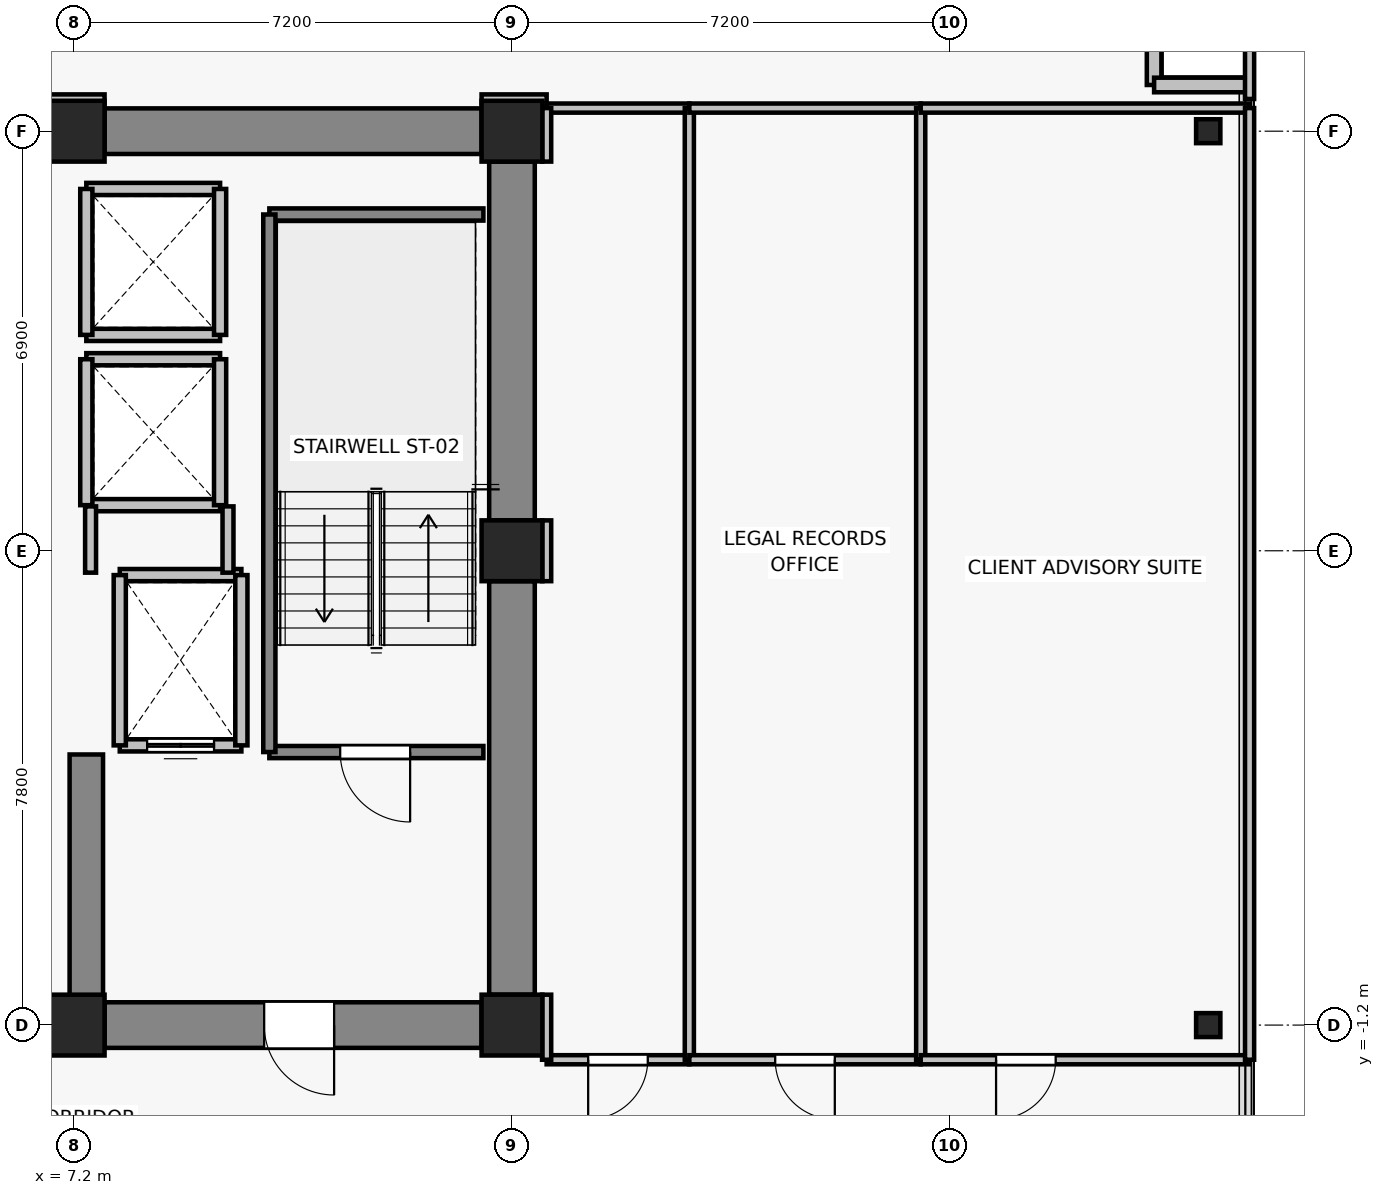
"""IFC4 building model, lengths in metres.
Left out: names, types, materials, properties, quantities, classifications, styles, units other than length and angle.
Written with IfcOpenShell. Run it as: python <this file> out.ifc"""

import sys

from ifc_helpers import new_model, si_unit, direction, frame, frame_2d, origin, origin_2d, place, context, subcontext, project, spatial, rectangle, i_section, extrude, source, transform, mapped, element, fill, save


model = new_model("IFC4")
c1 = context("Model", 3, precision=1e-05, world=origin(), true_north=direction((0.0, 1.0)))
c2 = subcontext(c1, "Body", "Model", "MODEL_VIEW")
j1 = project(units=[si_unit("LENGTHUNIT", "METRE"), si_unit("PLANEANGLEUNIT", "RADIAN")], contexts=[c1])
p1 = place(None, origin())
s1 = spatial("IfcSite", under=j1, at=p1, CompositionType="ELEMENT")
p2 = place(p1, origin())
s2 = spatial("IfcBuilding", under=s1, at=p2, CompositionType="ELEMENT")
p3 = place(p2, frame((0.0, 0.0, 192.4)))
s3 = spatial("IfcBuildingStorey", under=s2, at=p3, CompositionType="ELEMENT", Elevation=192.4)
for number, where, z_axis, x_axis in (
    (1, (7.2, -1.2, 0.0), (0.0, 0.0, 1.0), (1.0, 0.0, 0.0)),
    (2, (14.4, -1.2, 0.0), (0.0, 0.0, 1.0), (1.0, 0.0, 0.0)),
    (3, (14.4, 6.6, 0.0), (0.0, 0.0, 1.0), (1.0, 0.0, 0.0)),
    (4, (7.2, 13.5, 0.0), (0.0, 0.0, 1.0), (1.0, 0.0, 0.0)),
    (5, (14.4, 13.5, 0.0), (0.0, 0.0, 1.0), (1.0, 0.0, 0.0)),
):
    element("IfcColumn", number, at=place(p3, frame(where, z_axis=z_axis, x_axis=x_axis)), inside=s3, PredefinedType="COLUMN", context=c2, shape_type="SweptSolid", body=[
        extrude(rectangle(XDim=1.0, YDim=1.0, at=origin_2d()), origin(), (0.0, 0.0, 1.0), 3.3),
    ])
for number, where, z_axis, x_axis in (
    (6, (25.85, -1.2, 0.0), (0.0, 0.0, 1.0), (1.0, 0.0, 0.0)),
    (7, (25.85, 13.5, 0.0), (0.0, 0.0, 1.0), (1.0, 0.0, 0.0)),
):
    element("IfcColumn", number, at=place(p3, frame(where, z_axis=z_axis, x_axis=x_axis)), inside=s3, PredefinedType="COLUMN", context=c2, shape_type="SweptSolid", body=[
        extrude(i_section(OverallWidth=0.399, OverallDepth=0.394, WebThickness=0.023, FlangeThickness=0.037, FilletRadius=0.015, at=origin_2d()), origin(), (0.0, 0.0, 1.0), 3.3),
    ])
p4 = place(p3, frame((7.7, 13.5, 0.0), z_axis=(0.0, 0.0, 1.0), x_axis=(1.0, 0.0, 0.0)))
e8 = element("IfcWall", 8, at=p4, inside=s3, PredefinedType="SHEAR", context=c2, shape_type="SweptSolid", body=[
    extrude(rectangle(XDim=6.2, YDim=0.75, at=frame_2d((3.1, 0.0))), origin(), (0.0, 0.0, 1.0), 3.075),
])
p5 = place(p3, frame((14.4, -0.7, 0.0), z_axis=(0.0, 0.0, 1.0), x_axis=(0.0, 1.0, 0.0)))
e9 = element("IfcWall", 9, at=p5, inside=s3, PredefinedType="SHEAR", context=c2, shape_type="SweptSolid", body=[
    extrude(rectangle(XDim=6.8, YDim=0.75, at=frame_2d((3.4, 0.0))), origin(), (0.0, 0.0, 1.0), 3.075),
])
p6 = place(p3, frame((14.4, 7.1, 0.0), z_axis=(0.0, 0.0, 1.0), x_axis=(0.0, 1.0, 0.0)))
e10 = element("IfcWall", 10, at=p6, inside=s3, PredefinedType="SHEAR", context=c2, shape_type="SweptSolid", body=[
    extrude(rectangle(XDim=5.9, YDim=0.75, at=frame_2d((2.95, 0.0))), origin(), (0.0, 0.0, 1.0), 3.075),
])
p7 = place(p3, frame((13.9, -1.2, 0.0), z_axis=(0.0, 0.0, 1.0), x_axis=(-1.0, 0.0, 0.0)))
e11 = element("IfcWall", 11, at=p7, inside=s3, PredefinedType="SHEAR", context=c2, shape_type="SweptSolid", body=[
    extrude(rectangle(XDim=6.2, YDim=0.75, at=frame_2d((3.1, 0.0))), origin(), (0.0, 0.0, 1.0), 3.075),
])
p8 = place(p7, frame((2.425, 0.0, 0.0)))
e12 = element("IfcOpeningElement", 12, at=p8, cuts=e11, PredefinedType="OPENING", context=c2, shape_type="SweptSolid", body=[
    extrude(rectangle(XDim=1.15, YDim=2.15, at=frame_2d((0.575, 1.075))), frame((0.0, 0.385, 0.0), z_axis=(0.0, -1.0, 0.0), x_axis=(1.0, 0.0, 0.0)), (0.0, 0.0, 1.0), 0.77),
])
p9 = place(p3, frame((7.4, -0.825, 0.0), z_axis=(0.0, 0.0, 1.0), x_axis=(0.0, 1.0, 0.0)))
e13 = element("IfcWall", 13, at=p9, inside=s3, PredefinedType="SHEAR", context=c2, shape_type="SweptSolid", body=[
    extrude(rectangle(XDim=4.075, YDim=0.55, at=frame_2d((2.038, 0.0))), origin(), (0.0, 0.0, 1.0), 3.075),
])
for number, where, z_axis, x_axis in (
    (14, (24.96, 14.26, 0.0), (0.0, 0.0, 1.0), (0.0, 1.0, 0.0)),
    (15, (26.46, 14.26, 0.0), (0.0, 0.0, 1.0), (-1.0, 0.0, 0.0)),
):
    element("IfcWall", number, at=place(p3, frame(where, z_axis=z_axis, x_axis=x_axis)), inside=s3, PredefinedType="SOLIDWALL", context=c2, shape_type="SweptSolid", body=[
        extrude(rectangle(XDim=1.5, YDim=0.24, at=frame_2d((0.75, 0.0))), origin(), (0.0, 0.0, 1.0), 3.075),
    ])
p10 = place(p3, frame((9.95, 3.4, 0.0), z_axis=(0.0, 0.0, 1.0), x_axis=(-1.0, 0.0, 0.0)))
e16 = element("IfcWall", 16, at=p10, inside=s3, PredefinedType="SOLIDWALL", context=c2, shape_type="SweptSolid", body=[
    extrude(rectangle(XDim=2.0, YDim=0.2, at=frame_2d((1.0, 0.0))), origin(), (0.0, 0.0, 1.0), 3.075),
])
p11 = place(p10, frame((0.45, 0.0, 0.0)))
e17 = element("IfcOpeningElement", 17, at=p11, cuts=e16, PredefinedType="OPENING", context=c2, shape_type="SweptSolid", body=[
    extrude(rectangle(XDim=1.1, YDim=2.2, at=frame_2d((0.55, 1.1))), frame((0.0, 0.11, 0.0), z_axis=(0.0, -1.0, 0.0), x_axis=(1.0, 0.0, 0.0)), (0.0, 0.0, 1.0), 0.22),
])
p12 = place(p3, frame((7.95, 6.2, 0.0), z_axis=(0.0, 0.0, 1.0), x_axis=(1.0, 0.0, 0.0)))
e18 = element("IfcWall", 18, at=p12, inside=s3, PredefinedType="SOLIDWALL", context=c2, shape_type="SweptSolid", body=[
    extrude(rectangle(XDim=2.0, YDim=0.2, at=frame_2d((1.0, 0.0))), origin(), (0.0, 0.0, 1.0), 3.075),
])
for number, where, z_axis, x_axis in (
    (19, (7.95, 3.4, 0.0), (0.0, 0.0, 1.0), (0.0, 1.0, 0.0)),
    (20, (9.95, 6.2, 0.0), (0.0, 0.0, 1.0), (0.0, -1.0, 0.0)),
):
    element("IfcWall", number, at=place(p3, frame(where, z_axis=z_axis, x_axis=x_axis)), inside=s3, PredefinedType="SOLIDWALL", context=c2, shape_type="SweptSolid", body=[
        extrude(rectangle(XDim=2.8, YDim=0.2, at=frame_2d((1.4, 0.0))), origin(), (0.0, 0.0, 1.0), 3.075),
    ])
for number, where, z_axis, x_axis in (
    (21, (9.6, 7.35, 0.0), (0.0, 0.0, 1.0), (-1.0, 0.0, 0.0)),
    (22, (7.4, 9.75, 0.0), (0.0, 0.0, 1.0), (1.0, 0.0, 0.0)),
):
    element("IfcWall", number, at=place(p3, frame(where, z_axis=z_axis, x_axis=x_axis)), inside=s3, PredefinedType="SOLIDWALL", context=c2, shape_type="SweptSolid", body=[
        extrude(rectangle(XDim=2.2, YDim=0.2, at=frame_2d((1.1, 0.0))), origin(), (0.0, 0.0, 1.0), 2.565),
    ])
p13 = place(p3, frame((7.4, 7.35, 0.0), z_axis=(0.0, 0.0, 1.0), x_axis=(0.0, 1.0, 0.0)))
e23 = element("IfcWall", 23, at=p13, inside=s3, PredefinedType="SOLIDWALL", context=c2, shape_type="SweptSolid", body=[
    extrude(rectangle(XDim=2.4, YDim=0.2, at=frame_2d((1.2, 0.0))), origin(), (0.0, 0.0, 1.0), 2.565),
])
p14 = place(p3, frame((9.6, 9.75, 0.0), z_axis=(0.0, 0.0, 1.0), x_axis=(0.0, -1.0, 0.0)))
e24 = element("IfcWall", 24, at=p14, inside=s3, PredefinedType="SOLIDWALL", context=c2, shape_type="SweptSolid", body=[
    extrude(rectangle(XDim=2.4, YDim=0.2, at=frame_2d((1.2, 0.0))), origin(), (0.0, 0.0, 1.0), 3.075),
])
for number, where, z_axis, x_axis in (
    (25, (9.6, 10.15, 0.0), (0.0, 0.0, 1.0), (-1.0, 0.0, 0.0)),
    (26, (7.4, 12.55, 0.0), (0.0, 0.0, 1.0), (1.0, 0.0, 0.0)),
):
    element("IfcWall", number, at=place(p3, frame(where, z_axis=z_axis, x_axis=x_axis)), inside=s3, PredefinedType="SOLIDWALL", context=c2, shape_type="SweptSolid", body=[
        extrude(rectangle(XDim=2.2, YDim=0.2, at=frame_2d((1.1, 0.0))), origin(), (0.0, 0.0, 1.0), 2.565),
    ])
p15 = place(p3, frame((7.4, 10.15, 0.0), z_axis=(0.0, 0.0, 1.0), x_axis=(0.0, 1.0, 0.0)))
e27 = element("IfcWall", 27, at=p15, inside=s3, PredefinedType="SOLIDWALL", context=c2, shape_type="SweptSolid", body=[
    extrude(rectangle(XDim=2.4, YDim=0.2, at=frame_2d((1.2, 0.0))), origin(), (0.0, 0.0, 1.0), 2.565),
])
p16 = place(p3, frame((9.6, 12.55, 0.0), z_axis=(0.0, 0.0, 1.0), x_axis=(0.0, -1.0, 0.0)))
e28 = element("IfcWall", 28, at=p16, inside=s3, PredefinedType="SOLIDWALL", context=c2, shape_type="SweptSolid", body=[
    extrude(rectangle(XDim=2.4, YDim=0.2, at=frame_2d((1.2, 0.0))), origin(), (0.0, 0.0, 1.0), 3.075),
])
p17 = place(p3, frame((13.93, 3.29, 0.0), z_axis=(0.0, 0.0, 1.0), x_axis=(-1.0, 0.0, 0.0)))
e29 = element("IfcWall", 29, at=p17, inside=s3, PredefinedType="SOLIDWALL", context=c2, shape_type="SweptSolid", body=[
    extrude(rectangle(XDim=3.52, YDim=0.2, at=frame_2d((1.76, 0.0))), origin(), (0.0, 0.0, 1.0), 3.075),
])
p18 = place(p17, frame((1.205, 0.0, 0.0)))
e30 = element("IfcOpeningElement", 30, at=p18, cuts=e29, PredefinedType="OPENING", context=c2, shape_type="SweptSolid", body=[
    extrude(rectangle(XDim=1.15, YDim=2.15, at=frame_2d((0.575, 1.075))), frame((0.0, 0.11, 0.0), z_axis=(0.0, -1.0, 0.0), x_axis=(1.0, 0.0, 0.0)), (0.0, 0.0, 1.0), 0.22),
])
p19 = place(p3, frame((10.41, 12.13, 0.0), z_axis=(0.0, 0.0, 1.0), x_axis=(1.0, 0.0, 0.0)))
e31 = element("IfcWall", 31, at=p19, inside=s3, PredefinedType="SOLIDWALL", context=c2, shape_type="SweptSolid", body=[
    extrude(rectangle(XDim=3.52, YDim=0.2, at=frame_2d((1.76, 0.0))), origin(), (0.0, 0.0, 1.0), 3.075),
])
p20 = place(p3, frame((10.41, 3.29, 0.0), z_axis=(0.0, 0.0, 1.0), x_axis=(0.0, 1.0, 0.0)))
e32 = element("IfcWall", 32, at=p20, inside=s3, PredefinedType="SOLIDWALL", context=c2, shape_type="SweptSolid", body=[
    extrude(rectangle(XDim=8.84, YDim=0.2, at=frame_2d((4.42, 0.0))), origin(), (0.0, 0.0, 1.0), 3.075),
])
p21 = place(p3, frame((7.47, 6.24, 0.0), z_axis=(0.0, 0.0, 1.0), x_axis=(0.0, 1.0, 0.0)))
e33 = element("IfcWall", 33, at=p21, inside=s3, PredefinedType="PARTITIONING", context=c2, shape_type="SweptSolid", body=[
    extrude(rectangle(XDim=1.09, YDim=0.18, at=frame_2d((0.545, 0.0))), origin(), (0.0, 0.0, 1.0), 2.565),
])
p22 = place(p3, frame((9.73, 7.33, 0.0), z_axis=(0.0, 0.0, 1.0), x_axis=(0.0, -1.0, 0.0)))
e34 = element("IfcWall", 34, at=p22, inside=s3, PredefinedType="PARTITIONING", context=c2, shape_type="SweptSolid", body=[
    extrude(rectangle(XDim=1.09, YDim=0.18, at=frame_2d((0.545, 0.0))), origin(), (0.0, 0.0, 1.0), 3.075),
])
p23 = place(p3, frame((17.317, -1.77, 0.0), z_axis=(0.0, 0.0, 1.0), x_axis=(-1.0, 0.0, 0.0)))
e35 = element("IfcWall", 35, at=p23, inside=s3, PredefinedType="PARTITIONING", context=c2, shape_type="SweptSolid", body=[
    extrude(rectangle(XDim=2.347, YDim=0.15, at=frame_2d((1.173, 0.0))), origin(), (0.0, 0.0, 1.0), 3.075),
])
p24 = place(p23, frame((0.684, 0.0, 0.0)))
e36 = element("IfcOpeningElement", 36, at=p24, cuts=e35, PredefinedType="OPENING", context=c2, shape_type="SweptSolid", body=[
    extrude(rectangle(XDim=0.98, YDim=2.15, at=frame_2d((0.49, 1.075))), frame((0.0, 0.085, 0.0), z_axis=(0.0, -1.0, 0.0), x_axis=(1.0, 0.0, 0.0)), (0.0, 0.0, 1.0), 0.17),
])
p25 = place(p3, frame((14.97, 13.88, 0.0), z_axis=(0.0, 0.0, 1.0), x_axis=(1.0, 0.0, 0.0)))
e37 = element("IfcWall", 37, at=p25, inside=s3, PredefinedType="PARTITIONING", context=c2, shape_type="SweptSolid", body=[
    extrude(rectangle(XDim=2.347, YDim=0.15, at=frame_2d((1.173, 0.0))), origin(), (0.0, 0.0, 1.0), 3.075),
])
p26 = place(p3, frame((14.97, -1.77, 0.0), z_axis=(0.0, 0.0, 1.0), x_axis=(0.0, 1.0, 0.0)))
e38 = element("IfcWall", 38, at=p26, inside=s3, PredefinedType="PARTITIONING", context=c2, shape_type="SweptSolid", body=[
    extrude(rectangle(XDim=1.07, YDim=0.15, at=frame_2d((0.535, 0.0))), origin(), (0.0, 0.0, 1.0), 2.565),
])
p27 = place(p3, frame((14.97, 6.1, 0.0), z_axis=(0.0, 0.0, 1.0), x_axis=(0.0, 1.0, 0.0)))
e39 = element("IfcWall", 39, at=p27, inside=s3, PredefinedType="PARTITIONING", context=c2, shape_type="SweptSolid", body=[
    extrude(rectangle(XDim=1.0, YDim=0.15, at=frame_2d((0.5, 0.0))), origin(), (0.0, 0.0, 1.0), 3.075),
])
p28 = place(p3, frame((14.97, 13.0, 0.0), z_axis=(0.0, 0.0, 1.0), x_axis=(0.0, 1.0, 0.0)))
e40 = element("IfcWall", 40, at=p28, inside=s3, PredefinedType="PARTITIONING", context=c2, shape_type="SweptSolid", body=[
    extrude(rectangle(XDim=0.88, YDim=0.15, at=frame_2d((0.44, 0.0))), origin(), (0.0, 0.0, 1.0), 2.565),
])
p29 = place(p3, frame((17.317, 13.88, 0.0), z_axis=(0.0, 0.0, 1.0), x_axis=(0.0, -1.0, 0.0)))
e41 = element("IfcWall", 41, at=p29, inside=s3, PredefinedType="PARTITIONING", context=c2, shape_type="SweptSolid", body=[
    extrude(rectangle(XDim=15.65, YDim=0.15, at=frame_2d((7.825, 0.0))), origin(), (0.0, 0.0, 1.0), 2.565),
])
p30 = place(p3, frame((21.122, -1.77, 0.0), z_axis=(0.0, 0.0, 1.0), x_axis=(-1.0, 0.0, 0.0)))
e42 = element("IfcWall", 42, at=p30, inside=s3, PredefinedType="PARTITIONING", context=c2, shape_type="SweptSolid", body=[
    extrude(rectangle(XDim=3.805, YDim=0.15, at=frame_2d((1.902, 0.0))), origin(), (0.0, 0.0, 1.0), 3.075),
])
p31 = place(p30, frame((1.413, 0.0, 0.0)))
e43 = element("IfcOpeningElement", 43, at=p31, cuts=e42, PredefinedType="OPENING", context=c2, shape_type="SweptSolid", body=[
    extrude(rectangle(XDim=0.98, YDim=2.15, at=frame_2d((0.49, 1.075))), frame((0.0, 0.085, 0.0), z_axis=(0.0, -1.0, 0.0), x_axis=(1.0, 0.0, 0.0)), (0.0, 0.0, 1.0), 0.17),
])
p32 = place(p3, frame((17.317, 13.88, 0.0), z_axis=(0.0, 0.0, 1.0), x_axis=(1.0, 0.0, 0.0)))
e44 = element("IfcWall", 44, at=p32, inside=s3, PredefinedType="PARTITIONING", context=c2, shape_type="SweptSolid", body=[
    extrude(rectangle(XDim=3.805, YDim=0.15, at=frame_2d((1.902, 0.0))), origin(), (0.0, 0.0, 1.0), 3.075),
])
p33 = place(p3, frame((21.122, 13.88, 0.0), z_axis=(0.0, 0.0, 1.0), x_axis=(0.0, -1.0, 0.0)))
e45 = element("IfcWall", 45, at=p33, inside=s3, PredefinedType="PARTITIONING", context=c2, shape_type="SweptSolid", body=[
    extrude(rectangle(XDim=15.65, YDim=0.15, at=frame_2d((7.825, 0.0))), origin(), (0.0, 0.0, 1.0), 2.565),
])
p34 = place(p3, frame((26.53, -1.77, 0.0), z_axis=(0.0, 0.0, 1.0), x_axis=(-1.0, 0.0, 0.0)))
e46 = element("IfcWall", 46, at=p34, inside=s3, PredefinedType="PARTITIONING", context=c2, shape_type="SweptSolid", body=[
    extrude(rectangle(XDim=5.408, YDim=0.15, at=frame_2d((2.704, 0.0))), origin(), (0.0, 0.0, 1.0), 2.565),
])
p35 = place(p34, frame((3.189, 0.0, 0.0)))
e47 = element("IfcOpeningElement", 47, at=p35, cuts=e46, PredefinedType="OPENING", context=c2, shape_type="SweptSolid", body=[
    extrude(rectangle(XDim=0.98, YDim=2.15, at=frame_2d((0.49, 1.075))), frame((0.0, 0.085, 0.0), z_axis=(0.0, -1.0, 0.0), x_axis=(1.0, 0.0, 0.0)), (0.0, 0.0, 1.0), 0.17),
])
p36 = place(p3, frame((21.122, 13.88, 0.0), z_axis=(0.0, 0.0, 1.0), x_axis=(1.0, 0.0, 0.0)))
e48 = element("IfcWall", 48, at=p36, inside=s3, PredefinedType="PARTITIONING", context=c2, shape_type="SweptSolid", body=[
    extrude(rectangle(XDim=5.408, YDim=0.15, at=frame_2d((2.704, 0.0))), origin(), (0.0, 0.0, 1.0), 3.075),
])
p37 = place(p3, frame((26.53, 13.88, 0.0), z_axis=(0.0, 0.0, 1.0), x_axis=(0.0, -1.0, 0.0)))
e49 = element("IfcWall", 49, at=p37, inside=s3, PredefinedType="PARTITIONING", context=c2, shape_type="SweptSolid", body=[
    extrude(rectangle(XDim=15.65, YDim=0.15, at=frame_2d((7.825, 0.0))), origin(), (0.0, 0.0, 1.0), 3.075),
])
p38 = place(p3, frame((7.7, 14.03, 0.0), z_axis=(0.0, 0.0, 1.0), x_axis=(-1.0, 0.0, 0.0)))
e50 = element("IfcWall", 50, at=p38, inside=s3, PredefinedType="PARTITIONING", context=c2, shape_type="SweptSolid", body=[
    extrude(rectangle(XDim=1.0, YDim=0.15, at=frame_2d((0.5, 0.0))), origin(), (0.0, 0.0, 1.0), 2.565),
])
p39 = place(p3, frame((14.97, 14.03, 0.0), z_axis=(0.0, 0.0, 1.0), x_axis=(-1.0, 0.0, 0.0)))
e51 = element("IfcWall", 51, at=p39, inside=s3, PredefinedType="PARTITIONING", context=c2, shape_type="SweptSolid", body=[
    extrude(rectangle(XDim=1.07, YDim=0.15, at=frame_2d((0.535, 0.0))), origin(), (0.0, 0.0, 1.0), 2.565),
])
p40 = place(p3, frame((26.53, 17.33, 0.0), z_axis=(0.0, 0.0, 1.0), x_axis=(0.0, -1.0, 0.0)))
e52 = element("IfcWall", 52, at=p40, inside=s3, PredefinedType="PARTITIONING", context=c2, shape_type="SweptSolid", body=[
    extrude(rectangle(XDim=3.3, YDim=0.15, at=frame_2d((1.65, 0.0))), origin(), (0.0, 0.0, 1.0), 3.075),
])
m1 = source(origin(), c2, "Body", "SweptSolid", [
    extrude(rectangle(XDim=1.1, YDim=2.2, at=frame_2d((0.55, 1.1))), frame((0.0, 0.025, 0.0), z_axis=(0.0, -1.0, 0.0), x_axis=(1.0, 0.0, 0.0)), (0.0, 0.0, 1.0), 0.05),
])
p41 = place(p11, origin())
e53 = element("IfcDoor", 53, at=p41, inside=s3, OperationType="DOUBLE_DOOR_SLIDING", PredefinedType="DOOR", context=c2, shape_type="MappedRepresentation", body=[
    mapped(m1, transform((0.0, 0.0, 0.0), x_axis=(1.0, 0.0, 0.0), y_axis=(0.0, 1.0, 0.0), z_axis=(0.0, 0.0, 1.0), scale=1.0)),
])
fill(e17, e53)
m2 = source(origin(), c2, "Body", "SweptSolid", [
    extrude(rectangle(XDim=1.15, YDim=2.15, at=frame_2d((0.575, 1.075))), frame((0.0, 0.025, 0.0), z_axis=(0.0, -1.0, 0.0), x_axis=(1.0, 0.0, 0.0)), (0.0, 0.0, 1.0), 0.05),
])
p42 = place(p18, origin())
e54 = element("IfcDoor", 54, at=p42, inside=s3, OperationType="SINGLE_SWING_LEFT", PredefinedType="DOOR", context=c2, shape_type="MappedRepresentation", body=[
    mapped(m2, transform((0.0, 0.0, 0.0), x_axis=(1.0, 0.0, 0.0), y_axis=(0.0, 1.0, 0.0), z_axis=(0.0, 0.0, 1.0), scale=1.0)),
])
fill(e30, e54)
p43 = place(p8, origin())
e55 = element("IfcDoor", 55, at=p43, inside=s3, OperationType="SINGLE_SWING_LEFT", PredefinedType="DOOR", context=c2, shape_type="MappedRepresentation", body=[
    mapped(m2, transform((0.0, 0.0, 0.0), x_axis=(1.0, 0.0, 0.0), y_axis=(0.0, 1.0, 0.0), z_axis=(0.0, 0.0, 1.0), scale=1.0)),
])
fill(e12, e55)
m3 = source(origin(), c2, "Body", "SweptSolid", [
    extrude(rectangle(XDim=0.98, YDim=2.15, at=frame_2d((0.49, 1.075))), frame((0.0, 0.025, 0.0), z_axis=(0.0, -1.0, 0.0), x_axis=(1.0, 0.0, 0.0)), (0.0, 0.0, 1.0), 0.05),
])
p44 = place(p24, origin())
e56 = element("IfcDoor", 56, at=p44, inside=s3, OperationType="SINGLE_SWING_RIGHT", PredefinedType="DOOR", context=c2, shape_type="MappedRepresentation", body=[
    mapped(m3, transform((0.0, 0.0, 0.0), x_axis=(1.0, 0.0, 0.0), y_axis=(0.0, 1.0, 0.0), z_axis=(0.0, 0.0, 1.0), scale=1.0)),
])
fill(e36, e56)
p45 = place(p31, origin())
e57 = element("IfcDoor", 57, at=p45, inside=s3, OperationType="SINGLE_SWING_LEFT", PredefinedType="DOOR", context=c2, shape_type="MappedRepresentation", body=[
    mapped(m3, transform((0.0, 0.0, 0.0), x_axis=(1.0, 0.0, 0.0), y_axis=(0.0, 1.0, 0.0), z_axis=(0.0, 0.0, 1.0), scale=1.0)),
])
fill(e43, e57)
p46 = place(p35, origin())
e58 = element("IfcDoor", 58, at=p46, inside=s3, OperationType="SINGLE_SWING_RIGHT", PredefinedType="DOOR", context=c2, shape_type="MappedRepresentation", body=[
    mapped(m3, transform((0.0, 0.0, 0.0), x_axis=(1.0, 0.0, 0.0), y_axis=(0.0, 1.0, 0.0), z_axis=(0.0, 0.0, 1.0), scale=1.0)),
])
fill(e47, e58)
save(model, sys.argv[1])
